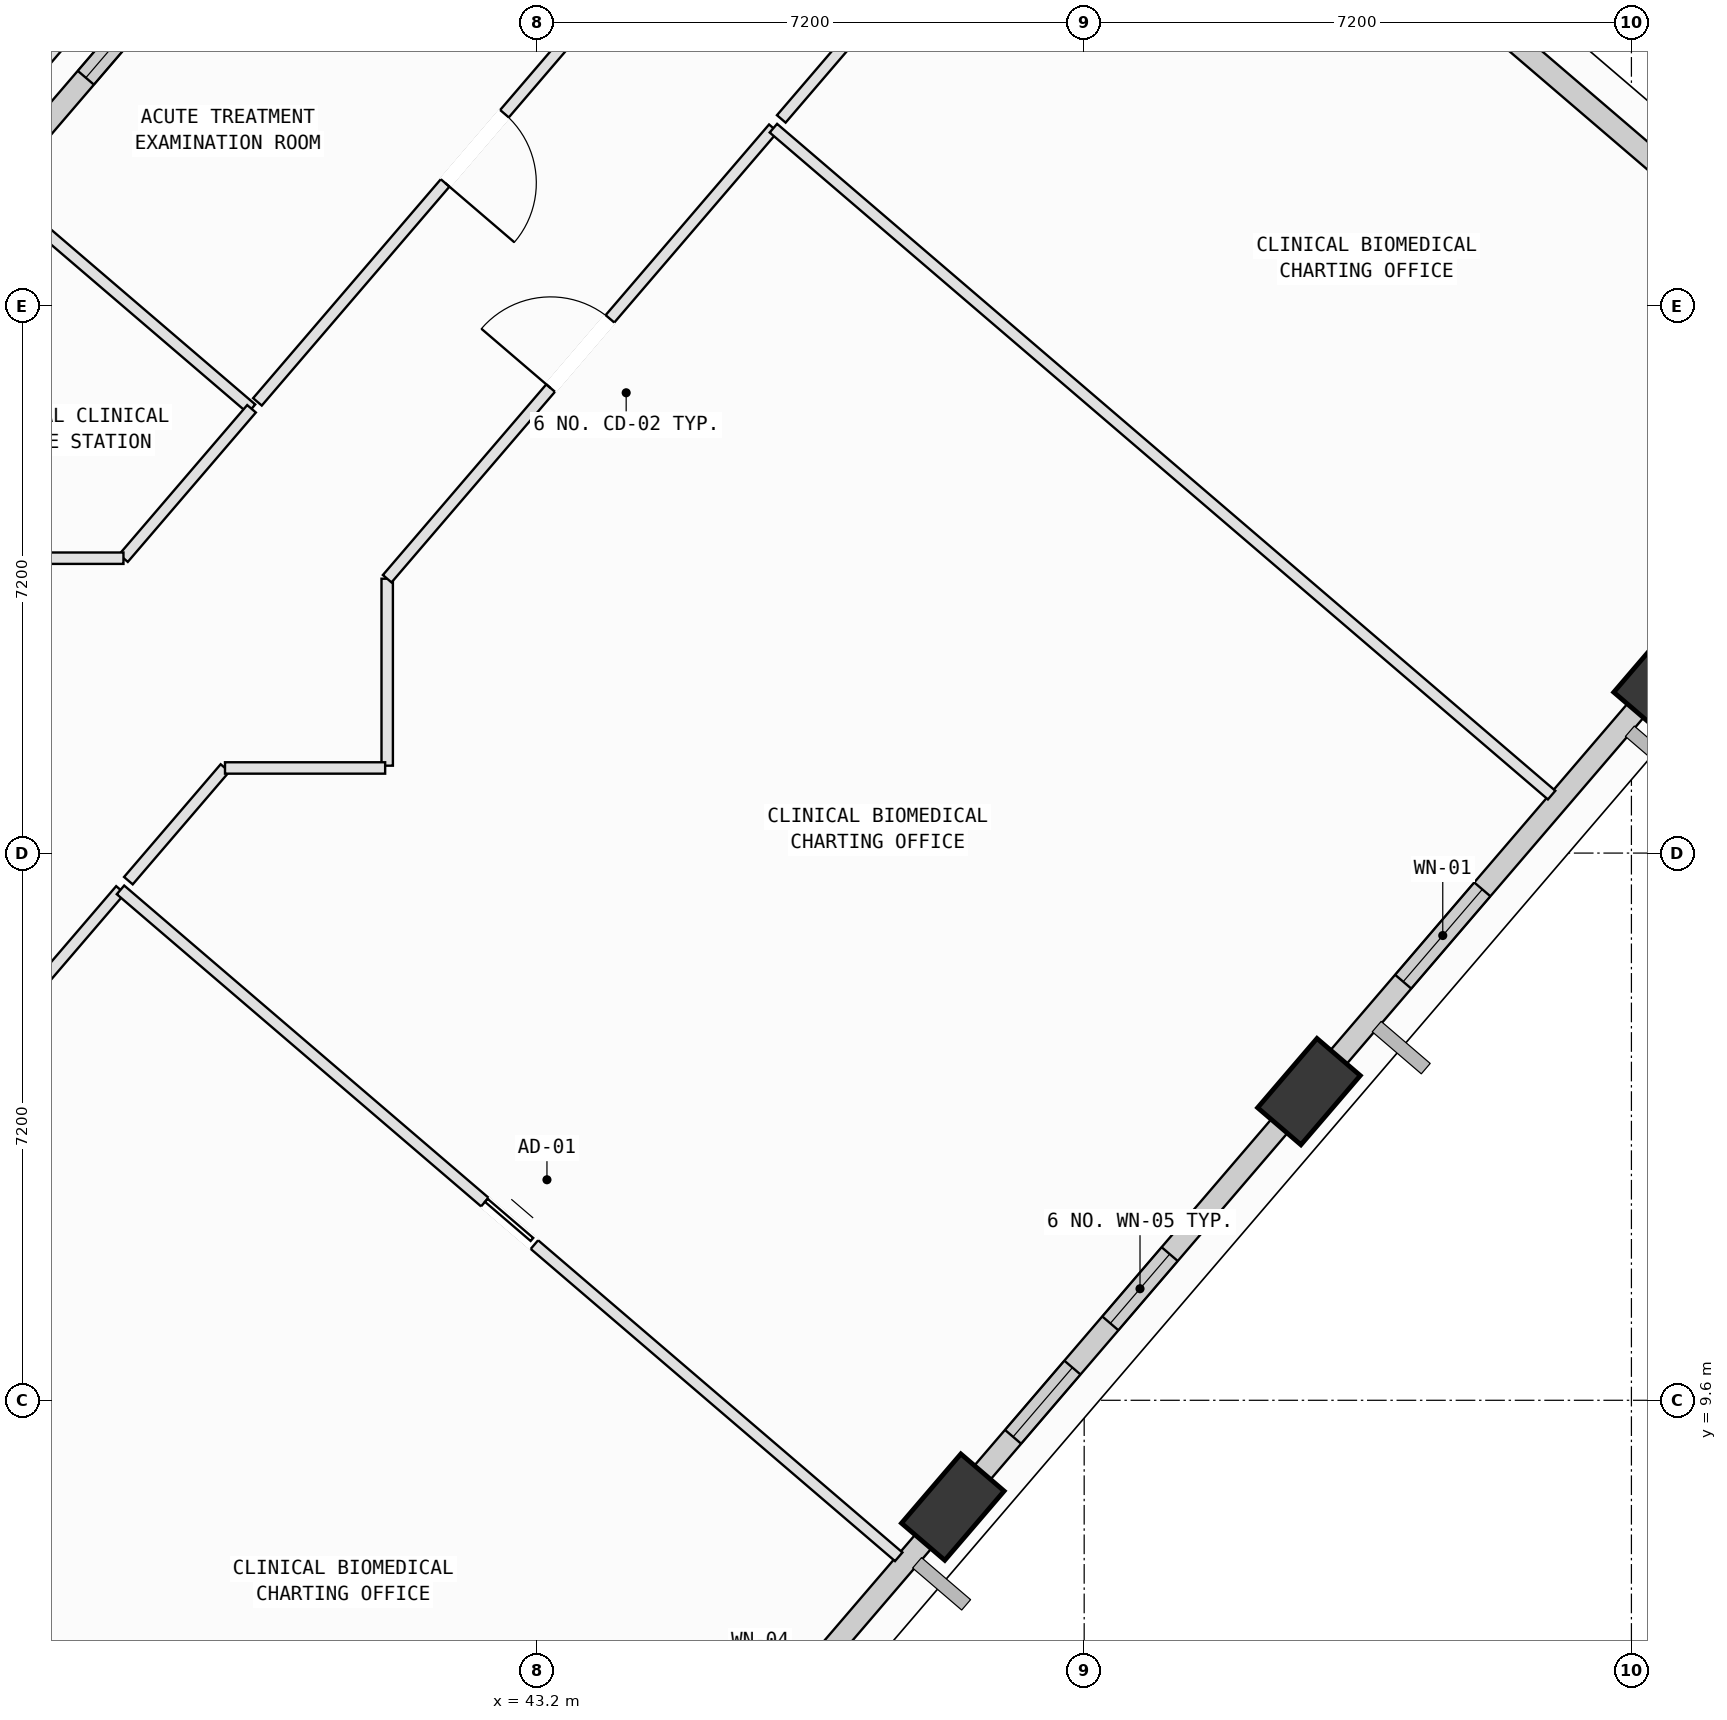
"""IFC4 building model, lengths in metres.
Left out: names, types, materials, properties, quantities, classifications, styles, units other than length and angle.
Written with IfcOpenShell. Run it as: python <this file> out.ifc"""

import sys

from ifc_helpers import new_model, si_unit, direction, frame, frame_2d, origin, origin_2d, place, context, subcontext, project, spatial, rectangle, extrude, element, fill, save


model = new_model("IFC4")
c1 = context("Model", 3, precision=1e-05, world=origin(), true_north=direction((0.0, 1.0)))
c2 = subcontext(c1, "Body", "Model", "MODEL_VIEW")
j1 = project(units=[si_unit("LENGTHUNIT", "METRE"), si_unit("PLANEANGLEUNIT", "RADIAN")], contexts=[c1])
p1 = place(None, origin())
s1 = spatial("IfcSite", under=j1, at=p1, CompositionType="ELEMENT")
p2 = place(p1, origin())
s2 = spatial("IfcBuilding", under=s1, at=p2, CompositionType="ELEMENT")
p3 = place(p2, frame((0.0, 0.0, 235.2)))
s3 = spatial("IfcBuildingStorey", under=s2, at=p3, CompositionType="ELEMENT", Elevation=235.2)
p4 = place(p3, frame((48.672, 8.194, 0.002), z_axis=(0.068067236507, 0.062775145733, 0.995703837691), x_axis=(-0.996940796812, -0.034150749565, 0.070304864389)))
e1 = element("IfcColumn", 1, at=p4, inside=s3, PredefinedType="COLUMN", context=c2, shape_type="SweptSolid", body=[
    extrude(rectangle(XDim=1.2, YDim=0.75, at=origin_2d()), origin(), (0.0, 0.0, 1.0), 4.014),
])
p5 = place(p3, frame((53.357, 13.661, 0.002), z_axis=(0.045312949129, 0.081928244936, 0.995607603086), x_axis=(-0.935339824004, -0.346534507037, 0.071086208679)))
e2 = element("IfcColumn", 2, at=p5, inside=s3, PredefinedType="COLUMN", context=c2, shape_type="SweptSolid", body=[
    extrude(rectangle(XDim=1.2, YDim=0.75, at=origin_2d()), origin(), (0.0, 0.0, 1.0), 4.014),
])
p6 = place(p3, frame((58.043, 19.128, 0.002), z_axis=(0.022543132475, 0.100988372435, 0.994632171112), x_axis=(-0.799671411694, -0.595275745742, 0.078564749414)))
e3 = element("IfcColumn", 3, at=p6, inside=s3, PredefinedType="COLUMN", context=c2, shape_type="SweptSolid", body=[
    extrude(rectangle(XDim=1.2, YDim=0.75, at=origin_2d()), origin(), (0.0, 0.0, 1.0), 4.018),
])
p7 = place(p3, frame((48.533, 8.033, 0.0), z_axis=(0.0, 0.0, 1.0), x_axis=(-0.65075688848, -0.759286159557, 0.0)))
e4 = element("IfcWall", 4, at=p7, inside=s3, PredefinedType="SOLIDWALL", context=c2, shape_type="SweptSolid", body=[
    extrude(rectangle(XDim=6.413, YDim=0.28, at=frame_2d((3.207, 0.0))), origin(), (0.0, 0.0, 1.0), 3.265),
])
p8 = place(p7, frame((2.783, 0.0, 0.75)))
e5 = element("IfcOpeningElement", 5, at=p8, cuts=e4, PredefinedType="OPENING", context=c2, shape_type="SweptSolid", body=[
    extrude(rectangle(XDim=1.8, YDim=2.05, at=frame_2d((0.9, 1.025))), frame((0.0, 0.15, 0.0), z_axis=(0.0, -1.0, 0.0), x_axis=(1.0, 0.0, 0.0)), (0.0, 0.0, 1.0), 0.3),
])
p9 = place(p3, frame((53.219, 13.5, 0.0), z_axis=(0.0, 0.0, 1.0), x_axis=(-0.650778820715, -0.759267361678, 0.0)))
e6 = element("IfcWall", 6, at=p9, inside=s3, PredefinedType="SOLIDWALL", context=c2, shape_type="SweptSolid", body=[
    extrude(rectangle(XDim=6.407, YDim=0.28, at=frame_2d((3.203, 0.0))), origin(), (0.0, 0.0, 1.0), 3.265),
])
p10 = place(p9, frame((2.604, 0.0, 0.75)))
e7 = element("IfcOpeningElement", 7, at=p10, cuts=e6, PredefinedType="OPENING", context=c2, shape_type="SweptSolid", body=[
    extrude(rectangle(XDim=1.2, YDim=1.75, at=frame_2d((0.6, 0.875))), frame((0.0, 0.15, 0.0), z_axis=(0.0, -1.0, 0.0), x_axis=(1.0, 0.0, 0.0)), (0.0, 0.0, 1.0), 0.3),
])
p11 = place(p9, frame((4.57, 0.0, 0.75)))
e8 = element("IfcOpeningElement", 8, at=p11, cuts=e6, PredefinedType="OPENING", context=c2, shape_type="SweptSolid", body=[
    extrude(rectangle(XDim=1.2, YDim=1.75, at=frame_2d((0.6, 0.875))), frame((0.0, 0.15, 0.0), z_axis=(0.0, -1.0, 0.0), x_axis=(1.0, 0.0, 0.0)), (0.0, 0.0, 1.0), 0.3),
])
p12 = place(p3, frame((57.912, 18.975, 0.0), z_axis=(0.0, 0.0, 1.0), x_axis=(-0.650781975929, -0.759264657287, 0.0)))
e9 = element("IfcWall", 9, at=p12, inside=s3, PredefinedType="SOLIDWALL", context=c2, shape_type="SweptSolid", body=[
    extrude(rectangle(XDim=6.418, YDim=0.28, at=frame_2d((3.209, 0.0))), origin(), (0.0, 0.0, 1.0), 3.265),
])
p13 = place(p12, frame((3.493, 0.0, 0.75)))
e10 = element("IfcOpeningElement", 10, at=p13, cuts=e9, PredefinedType="OPENING", context=c2, shape_type="SweptSolid", body=[
    extrude(rectangle(XDim=1.6, YDim=1.95, at=frame_2d((0.8, 0.975))), frame((0.0, 0.15, 0.0), z_axis=(0.0, -1.0, 0.0), x_axis=(1.0, 0.0, 0.0)), (0.0, 0.0, 1.0), 0.3),
])
p14 = place(p3, frame((53.014, 30.089, 0.0), z_axis=(0.0, 0.0, 1.0), x_axis=(0.759281059395, -0.650762839169, 0.0)))
e11 = element("IfcWall", 11, at=p14, inside=s3, PredefinedType="SOLIDWALL", context=c2, shape_type="SweptSolid", body=[
    extrude(rectangle(XDim=7.046, YDim=0.28, at=frame_2d((3.523, 0.0))), origin(), (0.0, 0.0, 1.0), 3.265),
])
p15 = place(p3, frame((35.151, 24.535, 0.0), z_axis=(0.0, 0.0, 1.0), x_axis=(0.65076314179, 0.759280800026, 0.0)))
e12 = element("IfcWall", 12, at=p15, inside=s3, PredefinedType="SOLIDWALL", context=c2, shape_type="SweptSolid", body=[
    extrude(rectangle(XDim=6.41, YDim=0.28, at=frame_2d((3.205, 0.0))), origin(), (0.0, 0.0, 1.0), 3.265),
])
p16 = place(p15, frame((3.248, 0.0, 0.75)))
e13 = element("IfcOpeningElement", 13, at=p16, cuts=e12, PredefinedType="OPENING", context=c2, shape_type="SweptSolid", body=[
    extrude(rectangle(XDim=1.6, YDim=1.95, at=frame_2d((0.8, 0.975))), frame((0.0, 0.15, 0.0), z_axis=(0.0, -1.0, 0.0), x_axis=(1.0, 0.0, 0.0)), (0.0, 0.0, 1.0), 0.3),
])
p17 = place(p3, frame((31.207, 7.675, 0.0), z_axis=(0.0, 0.0, 1.0), x_axis=(0.759272325888, -0.650773028897, 0.0)))
e14 = element("IfcWall", 14, at=p17, inside=s3, PredefinedType="PARTITIONING", context=c2, shape_type="SweptSolid", body=[
    extrude(rectangle(XDim=13.152, YDim=0.15, at=frame_2d((6.576, 0.0))), origin(), (0.0, 0.0, 1.0), 3.78),
])
p18 = place(p17, frame((6.393, 0.0, 0.0)))
e15 = element("IfcOpeningElement", 15, at=p18, cuts=e14, PredefinedType="OPENING", context=c2, shape_type="SweptSolid", body=[
    extrude(rectangle(XDim=0.86, YDim=2.06, at=frame_2d((0.43, 1.03))), frame((0.0, 0.085, 0.0), z_axis=(0.0, -1.0, 0.0), x_axis=(1.0, 0.0, 0.0)), (0.0, 0.0, 1.0), 0.17),
])
p19 = place(p3, frame((36.15, 14.483, 0.0), z_axis=(0.0, 0.0, 1.0), x_axis=(0.650766388243, 0.759278017549, 0.0)))
e16 = element("IfcWall", 16, at=p19, inside=s3, PredefinedType="PARTITIONING", context=c2, shape_type="SweptSolid", body=[
    extrude(rectangle(XDim=2.414, YDim=0.15, at=frame_2d((1.207, 0.0))), origin(), (0.0, 0.0, 1.0), 3.78),
])
p20 = place(p3, frame((37.721, 16.316, 0.0), z_axis=(0.0, 0.0, 1.0), x_axis=(0.759307720166, -0.650731731281, 0.0)))
e17 = element("IfcWall", 17, at=p20, inside=s3, PredefinedType="PARTITIONING", context=c2, shape_type="SweptSolid", body=[
    extrude(rectangle(XDim=13.485, YDim=0.15, at=frame_2d((6.742, 0.0))), origin(), (0.0, 0.0, 1.0), 3.78),
])
p21 = place(p20, frame((6.312, 0.0, 0.0)))
e18 = element("IfcOpeningElement", 18, at=p21, cuts=e17, PredefinedType="OPENING", context=c2, shape_type="SweptSolid", body=[
    extrude(rectangle(XDim=0.86, YDim=2.06, at=frame_2d((0.43, 1.03))), frame((0.0, 0.085, 0.0), z_axis=(0.0, -1.0, 0.0), x_axis=(1.0, 0.0, 0.0)), (0.0, 0.0, 1.0), 0.17),
])
p22 = place(p3, frame((41.23, 17.95, 0.0), z_axis=(0.0, 0.0, 1.0), x_axis=(0.0, 1.0, 0.0)))
e19 = element("IfcWall", 19, at=p22, inside=s3, PredefinedType="PARTITIONING", context=c2, shape_type="SweptSolid", body=[
    extrude(rectangle(XDim=2.46, YDim=0.15, at=frame_2d((1.23, 0.0))), origin(), (0.0, 0.0, 1.0), 3.78),
])
p23 = place(p3, frame((41.23, 20.41, 0.0), z_axis=(0.0, 0.0, 1.0), x_axis=(0.650786223128, 0.759261016902, 0.0)))
e20 = element("IfcWall", 20, at=p23, inside=s3, PredefinedType="PARTITIONING", context=c2, shape_type="SweptSolid", body=[
    extrude(rectangle(XDim=7.808, YDim=0.15, at=frame_2d((3.904, 0.0))), origin(), (0.0, 0.0, 1.0), 3.78),
])
p24 = place(p23, frame((3.304, 0.0, 0.0)))
e21 = element("IfcOpeningElement", 21, at=p24, cuts=e20, PredefinedType="OPENING", context=c2, shape_type="SweptSolid", body=[
    extrude(rectangle(XDim=1.2, YDim=2.15, at=frame_2d((0.6, 1.075))), frame((0.0, 0.085, 0.0), z_axis=(0.0, -1.0, 0.0), x_axis=(1.0, 0.0, 0.0)), (0.0, 0.0, 1.0), 0.17),
])
p25 = place(p3, frame((46.311, 26.338, 0.0), z_axis=(0.0, 0.0, 1.0), x_axis=(0.759307720166, -0.650731731281, 0.0)))
e22 = element("IfcWall", 22, at=p25, inside=s3, PredefinedType="PARTITIONING", context=c2, shape_type="SweptSolid", body=[
    extrude(rectangle(XDim=13.485, YDim=0.15, at=frame_2d((6.742, 0.0))), origin(), (0.0, 0.0, 1.0), 3.78),
])
p26 = place(p3, frame((53.909, 13.952, 0.0), z_axis=(0.0, 0.0, 1.0), x_axis=(-0.650715142145, -0.759321936851, 0.0)))
e23 = element("IfcWall", 23, at=p26, inside=s3, PredefinedType="PARTITIONING", context=c2, shape_type="SweptSolid", body=[
    extrude(rectangle(XDim=0.791, YDim=0.15, at=frame_2d((0.396, 0.0))), origin(), (0.0, 0.0, 1.0), 3.265),
])
p27 = place(p3, frame((49.225, 8.486, 0.0), z_axis=(0.0, 0.0, 1.0), x_axis=(-0.65094322188, -0.759126420228, 0.0)))
e24 = element("IfcWall", 24, at=p27, inside=s3, PredefinedType="PARTITIONING", context=c2, shape_type="SweptSolid", body=[
    extrude(rectangle(XDim=0.794, YDim=0.15, at=frame_2d((0.397, 0.0))), origin(), (0.0, 0.0, 1.0), 3.265),
])
p28 = place(p3, frame((37.825, 16.437, 0.0), z_axis=(0.0, 0.0, 1.0), x_axis=(0.650770784324, 0.759274249709, 0.0)))
e25 = element("IfcWall", 25, at=p28, inside=s3, PredefinedType="PARTITIONING", context=c2, shape_type="SweptSolid", body=[
    extrude(rectangle(XDim=1.953, YDim=0.15, at=frame_2d((0.977, 0.0))), origin(), (0.0, 0.0, 1.0), 3.78),
])
p29 = place(p3, frame((39.096, 17.92, 0.0), z_axis=(0.0, 0.0, 1.0), x_axis=(1.0, 0.0, 0.0)))
e26 = element("IfcWall", 26, at=p29, inside=s3, PredefinedType="PARTITIONING", context=c2, shape_type="SweptSolid", body=[
    extrude(rectangle(XDim=2.107, YDim=0.15, at=frame_2d((1.053, 0.0))), origin(), (0.0, 0.0, 1.0), 3.165),
])
p30 = place(p3, frame((46.415, 26.46, 0.0), z_axis=(0.0, 0.0, 1.0), x_axis=(0.650766865256, 0.759277608708, 0.0)))
e27 = element("IfcWall", 27, at=p30, inside=s3, PredefinedType="PARTITIONING", context=c2, shape_type="SweptSolid", body=[
    extrude(rectangle(XDim=6.563, YDim=0.15, at=frame_2d((3.281, 0.0))), origin(), (0.0, 0.0, 1.0), 3.78),
])
p31 = place(p30, frame((2.681, 0.0, 0.0)))
e28 = element("IfcOpeningElement", 28, at=p31, cuts=e27, PredefinedType="OPENING", context=c2, shape_type="SweptSolid", body=[
    extrude(rectangle(XDim=1.2, YDim=2.15, at=frame_2d((0.6, 1.075))), frame((0.0, 0.085, 0.0), z_axis=(0.0, -1.0, 0.0), x_axis=(1.0, 0.0, 0.0)), (0.0, 0.0, 1.0), 0.17),
])
p32 = place(p3, frame((36.123, 25.492, 0.0), z_axis=(0.0, 0.0, 1.0), x_axis=(0.759425980715, -0.650593713323, 0.0)))
e29 = element("IfcWall", 29, at=p32, inside=s3, PredefinedType="PARTITIONING", context=c2, shape_type="SweptSolid", body=[
    extrude(rectangle(XDim=4.374, YDim=0.15, at=frame_2d((2.187, 0.0))), origin(), (0.0, 0.0, 1.0), 3.78),
])
p33 = place(p3, frame((39.445, 22.646, 0.0), z_axis=(0.0, 0.0, 1.0), x_axis=(-0.650760314073, -0.759283223592, 0.0)))
e30 = element("IfcWall", 30, at=p33, inside=s3, PredefinedType="PARTITIONING", context=c2, shape_type="SweptSolid", body=[
    extrude(rectangle(XDim=2.589, YDim=0.15, at=frame_2d((1.295, 0.0))), origin(), (0.0, 0.0, 1.0), 3.78),
])
p34 = place(p3, frame((37.76, 20.68, 0.0), z_axis=(0.0, 0.0, 1.0), x_axis=(-1.0, 0.0, 0.0)))
e31 = element("IfcWall", 31, at=p34, inside=s3, PredefinedType="PARTITIONING", context=c2, shape_type="SweptSolid", body=[
    extrude(rectangle(XDim=5.762, YDim=0.15, at=frame_2d((2.881, 0.0))), origin(), (0.0, 0.0, 1.0), 3.415),
])
p35 = place(p34, frame((2.281, 0.0, 0.0)))
e32 = element("IfcOpeningElement", 32, at=p35, cuts=e31, PredefinedType="OPENING", context=c2, shape_type="SweptSolid", body=[
    extrude(rectangle(XDim=1.2, YDim=2.15, at=frame_2d((0.6, 1.075))), frame((0.0, 0.085, 0.0), z_axis=(0.0, -1.0, 0.0), x_axis=(1.0, 0.0, 0.0)), (0.0, 0.0, 1.0), 0.17),
])
p36 = place(p3, frame((45.242, 29.409, 0.0), z_axis=(0.0, 0.0, 1.0), x_axis=(-0.650807389163, -0.759242874324, 0.0)))
e33 = element("IfcWall", 33, at=p36, inside=s3, PredefinedType="PARTITIONING", context=c2, shape_type="SweptSolid", body=[
    extrude(rectangle(XDim=8.788, YDim=0.15, at=frame_2d((4.394, 0.0))), origin(), (0.0, 0.0, 1.0), 3.78),
])
p37 = place(p36, frame((3.794, 0.0, 0.0)))
e34 = element("IfcOpeningElement", 34, at=p37, cuts=e33, PredefinedType="OPENING", context=c2, shape_type="SweptSolid", body=[
    extrude(rectangle(XDim=1.2, YDim=2.15, at=frame_2d((0.6, 1.075))), frame((0.0, 0.085, 0.0), z_axis=(0.0, -1.0, 0.0), x_axis=(1.0, 0.0, 0.0)), (0.0, 0.0, 1.0), 0.17),
])
p38 = place(p3, frame((35.696, 26.017, 0.0), z_axis=(0.0, 0.0, 1.0), x_axis=(0.650807389163, 0.759242874324, 0.0)))
e35 = element("IfcWall", 35, at=p38, inside=s3, PredefinedType="PARTITIONING", context=c2, shape_type="SweptSolid", body=[
    extrude(rectangle(XDim=8.788, YDim=0.15, at=frame_2d((4.394, 0.0))), origin(), (0.0, 0.0, 1.0), 3.265),
])
p39 = place(p10, origin())
e36 = element("IfcWindow", 36, at=p39, inside=s3, PartitioningType="SINGLE_PANEL", PredefinedType="WINDOW", context=c2, shape_type="SweptSolid", body=[
    extrude(rectangle(XDim=1.2, YDim=1.75, at=frame_2d((0.6, 0.875))), frame((0.0, 0.03, 0.0), z_axis=(0.0, -1.0, 0.0), x_axis=(1.0, 0.0, 0.0)), (0.0, 0.0, 1.0), 0.06),
])
fill(e7, e36)
p40 = place(p11, origin())
e37 = element("IfcWindow", 37, at=p40, inside=s3, PartitioningType="SINGLE_PANEL", PredefinedType="WINDOW", context=c2, shape_type="SweptSolid", body=[
    extrude(rectangle(XDim=1.2, YDim=1.75, at=frame_2d((0.6, 0.875))), frame((0.0, 0.03, 0.0), z_axis=(0.0, -1.0, 0.0), x_axis=(1.0, 0.0, 0.0)), (0.0, 0.0, 1.0), 0.06),
])
fill(e8, e37)
p41 = place(p13, origin())
e38 = element("IfcWindow", 38, at=p41, inside=s3, PartitioningType="SINGLE_PANEL", PredefinedType="WINDOW", context=c2, shape_type="SweptSolid", body=[
    extrude(rectangle(XDim=1.6, YDim=1.95, at=frame_2d((0.8, 0.975))), frame((0.0, 0.03, 0.0), z_axis=(0.0, -1.0, 0.0), x_axis=(1.0, 0.0, 0.0)), (0.0, 0.0, 1.0), 0.06),
])
fill(e10, e38)
p42 = place(p16, origin())
e39 = element("IfcWindow", 39, at=p42, inside=s3, PartitioningType="SINGLE_PANEL", PredefinedType="WINDOW", context=c2, shape_type="SweptSolid", body=[
    extrude(rectangle(XDim=1.6, YDim=1.95, at=frame_2d((0.8, 0.975))), frame((0.0, 0.03, 0.0), z_axis=(0.0, -1.0, 0.0), x_axis=(1.0, 0.0, 0.0)), (0.0, 0.0, 1.0), 0.06),
])
fill(e13, e39)
p43 = place(p24, origin())
e40 = element("IfcDoor", 40, at=p43, inside=s3, OperationType="SINGLE_SWING_LEFT", PredefinedType="DOOR", context=c2, shape_type="SweptSolid", body=[
    extrude(rectangle(XDim=1.2, YDim=2.15, at=frame_2d((0.6, 1.075))), frame((0.0, 0.025, 0.0), z_axis=(0.0, -1.0, 0.0), x_axis=(1.0, 0.0, 0.0)), (0.0, 0.0, 1.0), 0.05),
])
fill(e21, e40)
p44 = place(p37, origin())
e41 = element("IfcDoor", 41, at=p44, inside=s3, OperationType="SINGLE_SWING_RIGHT", PredefinedType="DOOR", context=c2, shape_type="SweptSolid", body=[
    extrude(rectangle(XDim=1.2, YDim=2.15, at=frame_2d((0.6, 1.075))), frame((0.0, 0.025, 0.0), z_axis=(0.0, -1.0, 0.0), x_axis=(1.0, 0.0, 0.0)), (0.0, 0.0, 1.0), 0.05),
])
fill(e34, e41)
p45 = place(p21, origin())
e42 = element("IfcDoor", 42, at=p45, inside=s3, OperationType="SLIDING_TO_LEFT", PredefinedType="DOOR", context=c2, shape_type="SweptSolid", body=[
    extrude(rectangle(XDim=0.86, YDim=2.06, at=frame_2d((0.43, 1.03))), frame((0.0, 0.025, 0.0), z_axis=(0.0, -1.0, 0.0), x_axis=(1.0, 0.0, 0.0)), (0.0, 0.0, 1.0), 0.05),
])
fill(e18, e42)
save(model, sys.argv[1])
